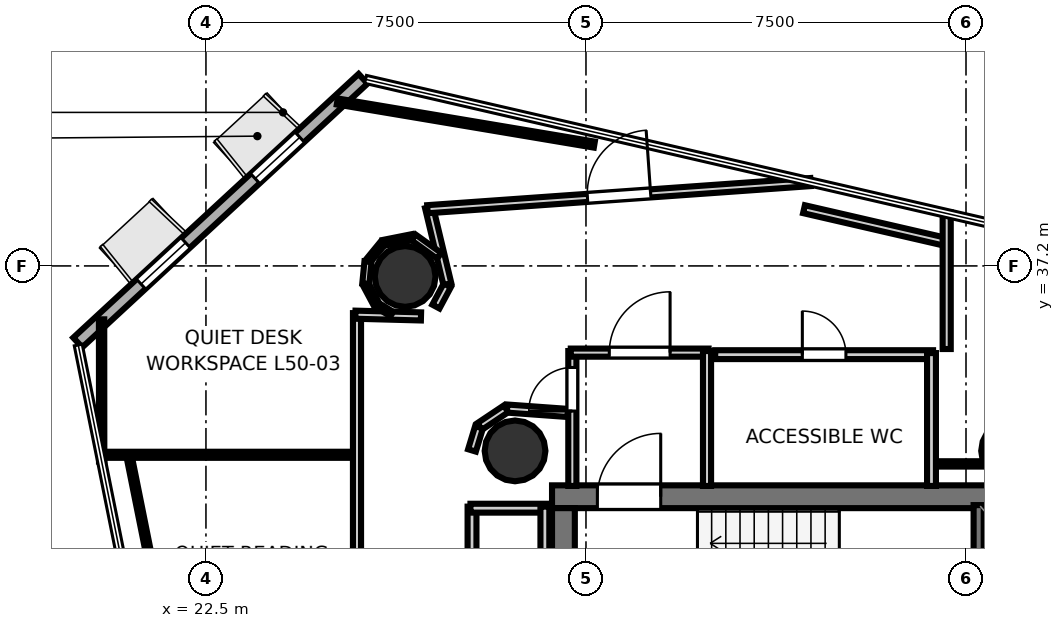
"""IFC4 building model, lengths in metres.
Left out: names, types, materials, properties, quantities, classifications, styles, units other than length and angle.
Written with IfcOpenShell. Run it as: python <this file> out.ifc"""

import sys

from ifc_helpers import new_model, si_unit, direction, frame, frame_2d, origin, origin_2d, place, context, subcontext, project, spatial, rectangle, hollow_circle, extrude, element, fill, save


model = new_model("IFC4")
c1 = context("Model", 3, precision=1e-05, world=origin(), true_north=direction((0.0, 1.0)))
c2 = subcontext(c1, "Body", "Model", "MODEL_VIEW")
j1 = project(units=[si_unit("LENGTHUNIT", "METRE"), si_unit("PLANEANGLEUNIT", "RADIAN")], contexts=[c1])
p1 = place(None, origin())
s1 = spatial("IfcSite", under=j1, at=p1, CompositionType="ELEMENT")
p2 = place(p1, origin())
s2 = spatial("IfcBuilding", under=s1, at=p2, CompositionType="ELEMENT")
p3 = place(p2, frame((0.0, 0.0, 196.6)))
s3 = spatial("IfcBuildingStorey", under=s2, at=p3, CompositionType="ELEMENT", Elevation=196.6)
p4 = place(p3, frame((29.33, 32.645, 0.0), z_axis=(0.0, 0.0, 1.0), x_axis=(1.0, 0.0, 0.0)))
e1 = element("IfcWall", 1, at=p4, inside=s3, PredefinedType="SHEAR", context=c2, shape_type="SweptSolid", body=[
    extrude(rectangle(XDim=10.52, YDim=0.45, at=frame_2d((5.26, 0.0))), origin(), (0.0, 0.0, 1.0), 3.52),
])
p5 = place(p4, frame((0.895, 0.0, 0.0)))
e2 = element("IfcOpeningElement", 2, at=p5, cuts=e1, PredefinedType="OPENING", context=c2, shape_type="SweptSolid", body=[
    extrude(rectangle(XDim=1.25, YDim=2.15, at=frame_2d((0.625, 1.075))), frame((0.0, 0.235, 0.0), z_axis=(0.0, -1.0, 0.0), x_axis=(1.0, 0.0, 0.0)), (0.0, 0.0, 1.0), 0.47),
])
p6 = place(p3, frame((29.555, 24.98, 0.0), z_axis=(0.0, 0.0, 1.0), x_axis=(0.0, 1.0, 0.0)))
e3 = element("IfcWall", 3, at=p6, inside=s3, PredefinedType="SHEAR", context=c2, shape_type="SweptSolid", body=[
    extrude(rectangle(XDim=7.44, YDim=0.45, at=frame_2d((3.72, 0.0))), origin(), (0.0, 0.0, 1.0), 3.52),
])
for number, where, z_axis, x_axis in (
    (4, (28.6, 33.55, 0.0), (0.0, 0.0, 1.0), (1.0, 0.0, 0.0)),
    (5, (38.4, 33.55, 0.0), (0.0, 0.0, 1.0), (1.0, 0.0, 0.0)),
    (6, (26.431, 36.992, 0.0), (0.0, 0.0, 1.0), (1.0, 0.0, 0.0)),
):
    element("IfcColumn", number, at=place(p3, frame(where, z_axis=z_axis, x_axis=x_axis)), inside=s3, PredefinedType="COLUMN", context=c2, shape_type="SweptSolid", body=[
        extrude(hollow_circle(Radius=0.6, WallThickness=0.03, at=origin_2d()), origin(), (0.0, 0.0, 1.0), 3.7),
    ])
p7 = place(p3, frame((25.601, 40.893, 0.0), z_axis=(0.0, 0.0, 1.0), x_axis=(-0.734371177533, -0.678748092896, 0.0)))
e7 = element("IfcWall", 7, at=p7, inside=s3, PredefinedType="SOLIDWALL", context=c2, shape_type="SweptSolid", body=[
    extrude(rectangle(XDim=7.668, YDim=0.26, at=frame_2d((3.834, 0.0))), origin(), (0.0, 0.0, 1.0), 3.52),
])
p8 = place(p7, frame((1.7, 0.0, 0.9)))
e8 = element("IfcOpeningElement", 8, at=p8, cuts=e7, PredefinedType="OPENING", context=c2, shape_type="SweptSolid", body=[
    extrude(rectangle(XDim=1.2, YDim=2.0, at=frame_2d((0.6, 1.0))), frame((0.0, 0.14, 0.0), z_axis=(0.0, -1.0, 0.0), x_axis=(1.0, 0.0, 0.0)), (0.0, 0.0, 1.0), 0.28),
])
p9 = place(p7, frame((4.768, 0.0, 0.9)))
e9 = element("IfcOpeningElement", 9, at=p9, cuts=e7, PredefinedType="OPENING", context=c2, shape_type="SweptSolid", body=[
    extrude(rectangle(XDim=1.2, YDim=2.0, at=frame_2d((0.6, 1.0))), frame((0.0, 0.14, 0.0), z_axis=(0.0, -1.0, 0.0), x_axis=(1.0, 0.0, 0.0)), (0.0, 0.0, 1.0), 0.28),
])
p10 = place(p3, frame((37.75, 30.12, 0.0), z_axis=(0.0, 0.0, 1.0), x_axis=(0.0, 1.0, 0.0)))
e10 = element("IfcWall", 10, at=p10, inside=s3, PredefinedType="SOLIDWALL", context=c2, shape_type="SweptSolid", body=[
    extrude(rectangle(XDim=2.36, YDim=0.2, at=frame_2d((1.18, 0.0))), origin(), (0.0, 0.0, 1.0), 3.52),
])
p11 = place(p3, frame((29.731, 32.858, 0.0), z_axis=(0.0, 0.0, 1.0), x_axis=(0.0, 1.0, 0.0)))
e11 = element("IfcWall", 11, at=p11, inside=s3, PredefinedType="PARTITIONING", context=c2, shape_type="SweptSolid", body=[
    extrude(rectangle(XDim=2.662, YDim=0.16, at=frame_2d((1.331, 0.0))), origin(), (0.0, 0.0, 1.0), 2.84),
])
p12 = place(p11, frame((1.478, 0.0, 0.0)))
e12 = element("IfcOpeningElement", 12, at=p12, cuts=e11, PredefinedType="OPENING", context=c2, shape_type="SweptSolid", body=[
    extrude(rectangle(XDim=0.86, YDim=2.05, at=frame_2d((0.43, 1.025))), frame((0.0, 0.09, 0.0), z_axis=(0.0, -1.0, 0.0), x_axis=(1.0, 0.0, 0.0)), (0.0, 0.0, 1.0), 0.18),
])
p13 = place(p3, frame((29.7, 35.489, 0.0), z_axis=(0.0, 0.0, 1.0), x_axis=(1.0, 0.0, 0.0)))
e13 = element("IfcWall", 13, at=p13, inside=s3, PredefinedType="PARTITIONING", context=c2, shape_type="SweptSolid", body=[
    extrude(rectangle(XDim=2.72, YDim=0.16, at=frame_2d((1.36, 0.0))), origin(), (0.0, 0.0, 1.0), 2.84),
])
p14 = place(p13, frame((0.76, 0.0, 0.0)))
e14 = element("IfcOpeningElement", 14, at=p14, cuts=e13, PredefinedType="OPENING", context=c2, shape_type="SweptSolid", body=[
    extrude(rectangle(XDim=1.2, YDim=2.15, at=frame_2d((0.6, 1.075))), frame((0.0, 0.09, 0.0), z_axis=(0.0, -1.0, 0.0), x_axis=(1.0, 0.0, 0.0)), (0.0, 0.0, 1.0), 0.18),
])
p15 = place(p3, frame((32.389, 35.52, 0.0), z_axis=(0.0, 0.0, 1.0), x_axis=(0.0, -1.0, 0.0)))
e15 = element("IfcWall", 15, at=p15, inside=s3, PredefinedType="PARTITIONING", context=c2, shape_type="SweptSolid", body=[
    extrude(rectangle(XDim=2.662, YDim=0.16, at=frame_2d((1.331, 0.0))), origin(), (0.0, 0.0, 1.0), 2.84),
])
p16 = place(p3, frame((32.55, 35.449, 0.0), z_axis=(0.0, 0.0, 1.0), x_axis=(1.0, 0.0, 0.0)))
e16 = element("IfcWall", 16, at=p16, inside=s3, PredefinedType="PLUMBINGWALL", context=c2, shape_type="SweptSolid", body=[
    extrude(rectangle(XDim=4.3, YDim=0.175, at=frame_2d((2.15, 0.0))), origin(), (0.0, 0.0, 1.0), 2.84),
])
p17 = place(p16, frame((1.72, 0.0, 0.0)))
e17 = element("IfcOpeningElement", 17, at=p17, cuts=e16, PredefinedType="OPENING", context=c2, shape_type="SweptSolid", body=[
    extrude(rectangle(XDim=0.86, YDim=2.05, at=frame_2d((0.43, 1.025))), frame((0.0, 0.097, 0.0), z_axis=(0.0, -1.0, 0.0), x_axis=(1.0, 0.0, 0.0)), (0.0, 0.0, 1.0), 0.195),
])
p18 = place(p3, frame((36.819, 35.48, 0.0), z_axis=(0.0, 0.0, 1.0), x_axis=(0.0, -1.0, 0.0)))
e18 = element("IfcWall", 18, at=p18, inside=s3, PredefinedType="PLUMBINGWALL", context=c2, shape_type="SweptSolid", body=[
    extrude(rectangle(XDim=2.622, YDim=0.175, at=frame_2d((1.311, 0.0))), origin(), (0.0, 0.0, 1.0), 2.84),
])
p19 = place(p3, frame((27.751, 28.48, 0.0), z_axis=(0.0, 0.0, 1.0), x_axis=(0.0, 1.0, 0.0)))
e19 = element("IfcWall", 19, at=p19, inside=s3, PredefinedType="PLUMBINGWALL", context=c2, shape_type="SweptSolid", body=[
    extrude(rectangle(XDim=3.97, YDim=0.175, at=frame_2d((1.985, 0.0))), origin(), (0.0, 0.0, 1.0), 2.84),
])
p20 = place(p19, frame((1.555, 0.0, 0.0)))
e20 = element("IfcOpeningElement", 20, at=p20, cuts=e19, PredefinedType="OPENING", context=c2, shape_type="SweptSolid", body=[
    extrude(rectangle(XDim=0.86, YDim=2.05, at=frame_2d((0.43, 1.025))), frame((0.0, 0.097, 0.0), z_axis=(0.0, -1.0, 0.0), x_axis=(1.0, 0.0, 0.0)), (0.0, 0.0, 1.0), 0.195),
])
p21 = place(p3, frame((27.72, 32.419, 0.0), z_axis=(0.0, 0.0, 1.0), x_axis=(1.0, 0.0, 0.0)))
e21 = element("IfcWall", 21, at=p21, inside=s3, PredefinedType="PLUMBINGWALL", context=c2, shape_type="SweptSolid", body=[
    extrude(rectangle(XDim=1.5, YDim=0.175, at=frame_2d((0.75, 0.0))), origin(), (0.0, 0.0, 1.0), 2.84),
])
p22 = place(p3, frame((29.189, 32.45, 0.0), z_axis=(0.0, 0.0, 1.0), x_axis=(0.0, -1.0, 0.0)))
e22 = element("IfcWall", 22, at=p22, inside=s3, PredefinedType="PLUMBINGWALL", context=c2, shape_type="SweptSolid", body=[
    extrude(rectangle(XDim=3.97, YDim=0.175, at=frame_2d((1.985, 0.0))), origin(), (0.0, 0.0, 1.0), 2.84),
])
p23 = place(p3, frame((27.265, 36.839, 0.0), z_axis=(0.0, 0.0, 1.0), x_axis=(-0.232734022169, 0.972540423286, 0.0)))
e23 = element("IfcWall", 23, at=p23, inside=s3, PredefinedType="PARTITIONING", context=c2, shape_type="SweptSolid", body=[
    extrude(rectangle(XDim=1.561, YDim=0.16, at=frame_2d((0.781, 0.0))), origin(), (0.0, 0.0, 1.0), 2.84),
])
p24 = place(p3, frame((26.872, 38.319, 0.0), z_axis=(0.0, 0.0, 1.0), x_axis=(0.997497948336, 0.070695424642, 0.0)))
e24 = element("IfcWall", 24, at=p24, inside=s3, PredefinedType="PARTITIONING", context=c2, shape_type="SweptSolid", body=[
    extrude(rectangle(XDim=7.58, YDim=0.16, at=frame_2d((3.79, 0.0))), origin(), (0.0, 0.0, 1.0), 2.84),
])
p25 = place(p24, frame((3.165, 0.0, 0.0)))
e25 = element("IfcOpeningElement", 25, at=p25, cuts=e24, PredefinedType="OPENING", context=c2, shape_type="SweptSolid", body=[
    extrude(rectangle(XDim=1.25, YDim=2.2, at=frame_2d((0.625, 1.1))), frame((0.0, 0.09, 0.0), z_axis=(0.0, -1.0, 0.0), x_axis=(1.0, 0.0, 0.0)), (0.0, 0.0, 1.0), 0.18),
])
p26 = place(p3, frame((34.302, 38.32, 0.0), z_axis=(0.0, 0.0, 1.0), x_axis=(0.974391195695, -0.224859506699, 0.0)))
e26 = element("IfcWall", 26, at=p26, inside=s3, PredefinedType="PARTITIONING", context=c2, shape_type="SweptSolid", body=[
    extrude(rectangle(XDim=2.915, YDim=0.16, at=frame_2d((1.458, 0.0))), origin(), (0.0, 0.0, 1.0), 2.84),
])
p27 = place(p3, frame((37.119, 38.255, 0.0), z_axis=(0.0, 0.0, 1.0), x_axis=(0.0, -1.0, 0.0)))
e27 = element("IfcWall", 27, at=p27, inside=s3, PredefinedType="PARTITIONING", context=c2, shape_type="SweptSolid", body=[
    extrude(rectangle(XDim=2.695, YDim=0.16, at=frame_2d((1.348, 0.0))), origin(), (0.0, 0.0, 1.0), 2.84),
])
p28 = place(p3, frame((29.64, 34.299, 0.0), z_axis=(0.0, 0.0, 1.0), x_axis=(-0.997392224386, 0.072171675429, 0.0)))
e28 = element("IfcWall", 28, at=p28, inside=s3, PredefinedType="PARTITIONING", context=c2, shape_type="SweptSolid", body=[
    extrude(rectangle(XDim=1.201, YDim=0.16, at=frame_2d((0.601, 0.0))), origin(), (0.0, 0.0, 1.0), 2.84),
])
p29 = place(p3, frame((28.423, 34.38, 0.0), z_axis=(0.0, 0.0, 1.0), x_axis=(-0.831571279003, -0.555418047903, 0.0)))
e29 = element("IfcWall", 29, at=p29, inside=s3, PredefinedType="PARTITIONING", context=c2, shape_type="SweptSolid", body=[
    extrude(rectangle(XDim=0.628, YDim=0.16, at=frame_2d((0.314, 0.0))), origin(), (0.0, 0.0, 1.0), 2.84),
])
p30 = place(p3, frame((27.888, 34.015, 0.0), z_axis=(0.0, 0.0, 1.0), x_axis=(-0.290263585829, -0.956946733492, 0.0)))
e30 = element("IfcWall", 30, at=p30, inside=s3, PredefinedType="PARTITIONING", context=c2, shape_type="SweptSolid", body=[
    extrude(rectangle(XDim=0.476, YDim=0.16, at=frame_2d((0.238, 0.0))), origin(), (0.0, 0.0, 1.0), 2.84),
])
p31 = place(p3, frame((25.481, 18.05, 0.0), z_axis=(0.0, 0.0, 1.0), x_axis=(0.0, 1.0, 0.0)))
e31 = element("IfcWall", 31, at=p31, inside=s3, PredefinedType="PARTITIONING", context=c2, shape_type="SweptSolid", body=[
    extrude(rectangle(XDim=18.219, YDim=0.16, at=frame_2d((9.109, 0.0))), origin(), (0.0, 0.0, 1.0), 2.84),
])
p32 = place(p31, frame((0.369, 0.0, 0.0)))
e32 = element("IfcOpeningElement", 32, at=p32, cuts=e31, PredefinedType="OPENING", context=c2, shape_type="SweptSolid", body=[
    extrude(rectangle(XDim=1.05, YDim=2.15, at=frame_2d((0.525, 1.075))), frame((0.0, 0.09, 0.0), z_axis=(0.0, -1.0, 0.0), x_axis=(1.0, 0.0, 0.0)), (0.0, 0.0, 1.0), 0.18),
])
p33 = place(p31, frame((9.975, 0.0, 0.0)))
e33 = element("IfcOpeningElement", 33, at=p33, cuts=e31, PredefinedType="OPENING", context=c2, shape_type="SweptSolid", body=[
    extrude(rectangle(XDim=1.25, YDim=2.2, at=frame_2d((0.625, 1.1))), frame((0.0, 0.09, 0.0), z_axis=(0.0, -1.0, 0.0), x_axis=(1.0, 0.0, 0.0)), (0.0, 0.0, 1.0), 0.18),
])
p34 = place(p3, frame((25.449, 36.238, 0.0), z_axis=(0.0, 0.0, 1.0), x_axis=(0.999651698073, -0.026390955635, 0.0)))
e34 = element("IfcWall", 34, at=p34, inside=s3, PredefinedType="PARTITIONING", context=c2, shape_type="SweptSolid", body=[
    extrude(rectangle(XDim=1.295, YDim=0.16, at=frame_2d((0.647, 0.0))), origin(), (0.0, 0.0, 1.0), 2.84),
])
p35 = place(p3, frame((27.038, 36.398, 0.0), z_axis=(0.0, 0.0, 1.0), x_axis=(0.471865548338, 0.881670519123, 0.0)))
e35 = element("IfcWall", 35, at=p35, inside=s3, PredefinedType="PARTITIONING", context=c2, shape_type="SweptSolid", body=[
    extrude(rectangle(XDim=0.476, YDim=0.16, at=frame_2d((0.238, 0.0))), origin(), (0.0, 0.0, 1.0), 2.84),
])
p36 = place(p3, frame((39.8, 33.293, 0.0), z_axis=(0.0, 0.0, 1.0), x_axis=(-1.0, 0.0, 0.0)))
e36 = element("IfcWall", 36, at=p36, inside=s3, PredefinedType="PARTITIONING", context=c2, shape_type="SweptSolid", body=[
    extrude(rectangle(XDim=2.87, YDim=0.105, at=frame_2d((1.435, 0.0))), origin(), (0.0, 0.0, 1.0), 2.84),
])
p37 = place(p3, frame((27.102, 37.399, 0.0), z_axis=(0.0, 0.0, 1.0), x_axis=(-0.811712980853, 0.584056535546, 0.0)))
e37 = element("IfcWall", 37, at=p37, inside=s3, PredefinedType="PARTITIONING", context=c2, shape_type="SweptSolid", body=[
    extrude(rectangle(XDim=0.622, YDim=0.14, at=frame_2d((0.311, 0.0))), origin(), (0.0, 0.0, 1.0), 2.84),
])
p38 = place(p3, frame((26.573, 37.768, 0.0), z_axis=(0.0, 0.0, 1.0), x_axis=(-0.980773892286, -0.195147565217, 0.0)))
e38 = element("IfcWall", 38, at=p38, inside=s3, PredefinedType="PARTITIONING", context=c2, shape_type="SweptSolid", body=[
    extrude(rectangle(XDim=0.582, YDim=0.12, at=frame_2d((0.291, 0.0))), origin(), (0.0, 0.0, 1.0), 2.84),
])
p39 = place(p3, frame((25.985, 37.644, 0.0), z_axis=(0.0, 0.0, 1.0), x_axis=(-0.634562438402, -0.772871601088, 0.0)))
e39 = element("IfcWall", 39, at=p39, inside=s3, PredefinedType="PARTITIONING", context=c2, shape_type="SweptSolid", body=[
    extrude(rectangle(XDim=0.441, YDim=0.105, at=frame_2d((0.221, 0.0))), origin(), (0.0, 0.0, 1.0), 2.84),
])
p40 = place(p3, frame((25.698, 37.286, 0.0), z_axis=(0.0, 0.0, 1.0), x_axis=(-0.097915215421, -0.995194760129, 0.0)))
e40 = element("IfcWall", 40, at=p40, inside=s3, PredefinedType="PARTITIONING", context=c2, shape_type="SweptSolid", body=[
    extrude(rectangle(XDim=0.441, YDim=0.14, at=frame_2d((0.221, 0.0))), origin(), (0.0, 0.0, 1.0), 2.84),
])
p41 = place(p3, frame((25.658, 36.829, 0.0), z_axis=(0.0, 0.0, 1.0), x_axis=(0.471392110461, -0.881923737177, 0.0)))
e41 = element("IfcWall", 41, at=p41, inside=s3, PredefinedType="PARTITIONING", context=c2, shape_type="SweptSolid", body=[
    extrude(rectangle(XDim=0.441, YDim=0.12, at=frame_2d((0.221, 0.0))), origin(), (0.0, 0.0, 1.0), 2.84),
])
p42 = place(p3, frame((25.877, 36.428, 0.0), z_axis=(0.0, 0.0, 1.0), x_axis=(0.852322728649, -0.523016219853, 0.0)))
e42 = element("IfcWall", 42, at=p42, inside=s3, PredefinedType="PARTITIONING", context=c2, shape_type="SweptSolid", body=[
    extrude(rectangle(XDim=0.34, YDim=0.105, at=frame_2d((0.17, 0.0))), origin(), (0.0, 0.0, 1.0), 2.84),
])
p43 = place(p3, frame((25.37, 33.473, 0.0), z_axis=(0.0, 0.0, 1.0), x_axis=(-1.0, 0.0, 0.0)))
e43 = element("IfcWall", 43, at=p43, inside=s3, PredefinedType="PARTITIONING", context=c2, shape_type="SweptSolid", body=[
    extrude(rectangle(XDim=4.975, YDim=0.12, at=frame_2d((2.488, 0.0))), origin(), (0.0, 0.0, 1.0), 2.84),
])
p44 = place(p3, frame((20.442, 33.34, 0.0), z_axis=(0.0, 0.0, 1.0), x_axis=(-0.000608960305, 0.999999814584, 0.0)))
e44 = element("IfcWall", 44, at=p44, inside=s3, PredefinedType="PARTITIONING", context=c2, shape_type="SweptSolid", body=[
    extrude(rectangle(XDim=2.806, YDim=0.105, at=frame_2d((1.403, 0.0))), origin(), (0.0, 0.0, 1.0), 2.84),
])
p45 = place(p3, frame((25.092, 40.445, 0.0), z_axis=(0.0, 0.0, 1.0), x_axis=(0.986208576086, -0.165507233844, 0.0)))
e45 = element("IfcWall", 45, at=p45, inside=s3, PredefinedType="PARTITIONING", context=c2, shape_type="SweptSolid", body=[
    extrude(rectangle(XDim=5.144, YDim=0.12, at=frame_2d((2.572, 0.0))), origin(), (0.0, 0.0, 1.0), 2.84),
])
p46 = place(p3, frame((22.891, 23.948, 0.0), z_axis=(0.0, 0.0, 1.0), x_axis=(-0.196981324141, 0.980407240865, 0.0)))
e46 = element("IfcWall", 46, at=p46, inside=s3, PredefinedType="PARTITIONING", context=c2, shape_type="SweptSolid", body=[
    extrude(rectangle(XDim=9.604, YDim=0.105, at=frame_2d((4.802, 0.0))), origin(), (0.0, 0.0, 1.0), 2.84),
])
p47 = place(p5, origin())
e47 = element("IfcDoor", 47, at=p47, inside=s3, OperationType="SINGLE_SWING_RIGHT", PredefinedType="DOOR", context=c2, shape_type="SweptSolid", body=[
    extrude(rectangle(XDim=1.25, YDim=2.15, at=frame_2d((0.625, 1.075))), frame((0.0, 0.025, 0.0), z_axis=(0.0, -1.0, 0.0), x_axis=(1.0, 0.0, 0.0)), (0.0, 0.0, 1.0), 0.05),
])
fill(e2, e47)
p48 = place(p14, origin())
e48 = element("IfcDoor", 48, at=p48, inside=s3, OperationType="SINGLE_SWING_RIGHT", PredefinedType="DOOR", context=c2, shape_type="SweptSolid", body=[
    extrude(rectangle(XDim=1.2, YDim=2.15, at=frame_2d((0.6, 1.075))), frame((0.0, 0.025, 0.0), z_axis=(0.0, -1.0, 0.0), x_axis=(1.0, 0.0, 0.0)), (0.0, 0.0, 1.0), 0.05),
])
fill(e14, e48)
p49 = place(p17, origin())
e49 = element("IfcDoor", 49, at=p49, inside=s3, OperationType="SINGLE_SWING_LEFT", PredefinedType="DOOR", context=c2, shape_type="SweptSolid", body=[
    extrude(rectangle(XDim=0.86, YDim=2.05, at=frame_2d((0.43, 1.025))), frame((0.0, 0.025, 0.0), z_axis=(0.0, -1.0, 0.0), x_axis=(1.0, 0.0, 0.0)), (0.0, 0.0, 1.0), 0.05),
])
fill(e17, e49)
p50 = place(p12, origin())
e50 = element("IfcDoor", 50, at=p50, inside=s3, OperationType="SINGLE_SWING_LEFT", PredefinedType="DOOR", context=c2, shape_type="SweptSolid", body=[
    extrude(rectangle(XDim=0.86, YDim=2.05, at=frame_2d((0.43, 1.025))), frame((0.0, 0.025, 0.0), z_axis=(0.0, -1.0, 0.0), x_axis=(1.0, 0.0, 0.0)), (0.0, 0.0, 1.0), 0.05),
])
fill(e12, e50)
p51 = place(p25, origin())
e51 = element("IfcDoor", 51, at=p51, inside=s3, OperationType="SINGLE_SWING_RIGHT", PredefinedType="DOOR", context=c2, shape_type="SweptSolid", body=[
    extrude(rectangle(XDim=1.25, YDim=2.2, at=frame_2d((0.625, 1.1))), frame((0.0, 0.025, 0.0), z_axis=(0.0, -1.0, 0.0), x_axis=(1.0, 0.0, 0.0)), (0.0, 0.0, 1.0), 0.05),
])
fill(e25, e51)
p52 = place(p8, origin())
e52 = element("IfcWindow", 52, at=p52, inside=s3, PartitioningType="SINGLE_PANEL", PredefinedType="WINDOW", context=c2, shape_type="SweptSolid", body=[
    extrude(rectangle(XDim=1.2, YDim=2.0, at=frame_2d((0.6, 1.0))), frame((0.0, 0.03, 0.0), z_axis=(0.0, -1.0, 0.0), x_axis=(1.0, 0.0, 0.0)), (0.0, 0.0, 1.0), 0.06),
])
fill(e8, e52)
p53 = place(p9, origin())
e53 = element("IfcWindow", 53, at=p53, inside=s3, PartitioningType="SINGLE_PANEL", PredefinedType="WINDOW", context=c2, shape_type="SweptSolid", body=[
    extrude(rectangle(XDim=1.2, YDim=2.0, at=frame_2d((0.6, 1.0))), frame((0.0, 0.03, 0.0), z_axis=(0.0, -1.0, 0.0), x_axis=(1.0, 0.0, 0.0)), (0.0, 0.0, 1.0), 0.06),
])
fill(e9, e53)
save(model, sys.argv[1])
